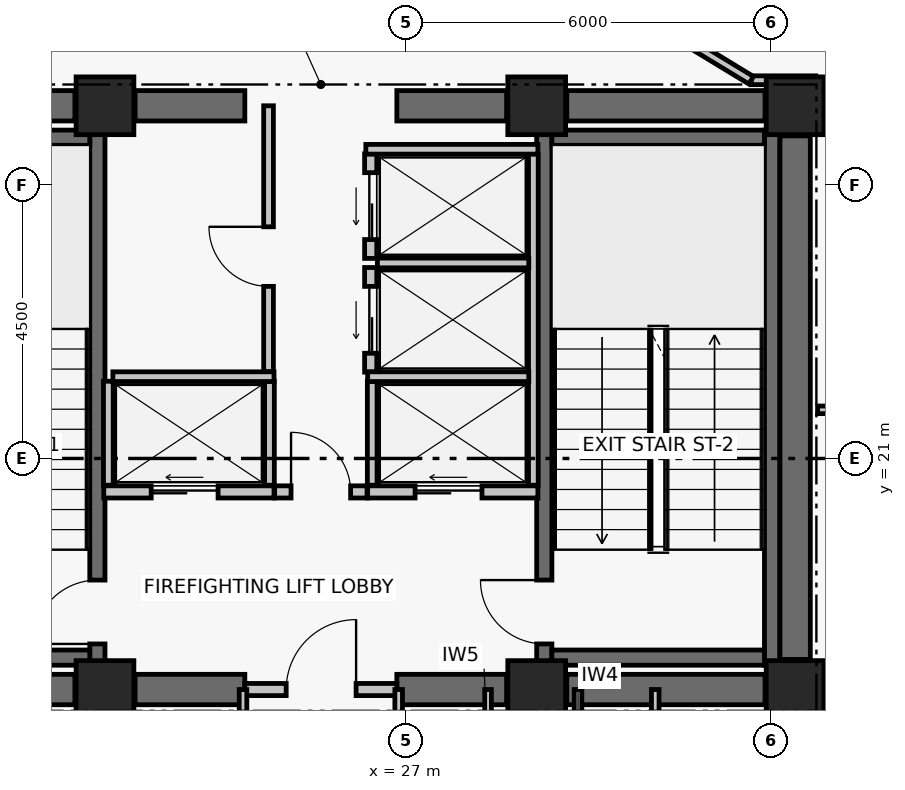
"""IFC4 building model, lengths in metres.
Left out: names, types, materials, properties, quantities, classifications, styles, units other than length and angle.
Written with IfcOpenShell. Run it as: python <this file> out.ifc"""

import sys

from ifc_helpers import new_model, si_unit, direction, frame, frame_2d, origin, origin_2d, place, context, subcontext, project, spatial, rectangle, extrude, element, fill, save


model = new_model("IFC4")
c1 = context("Model", 3, precision=1e-05, world=origin(), true_north=direction((0.0, 1.0)))
c2 = subcontext(c1, "Body", "Model", "MODEL_VIEW")
j1 = project(units=[si_unit("LENGTHUNIT", "METRE"), si_unit("PLANEANGLEUNIT", "RADIAN")], contexts=[c1])
p1 = place(None, origin())
s1 = spatial("IfcSite", under=j1, at=p1, CompositionType="ELEMENT")
p2 = place(p1, origin())
s2 = spatial("IfcBuilding", under=s1, at=p2, CompositionType="ELEMENT")
p3 = place(p2, frame((0.0, 0.0, 172.92)))
s3 = spatial("IfcBuildingStorey", under=s2, at=p3, CompositionType="ELEMENT", Elevation=172.92)
for number, where, z_axis, x_axis in (
    (1, (22.05, 17.2, 0.0), (0.0, 0.0, 1.0), (1.0, 0.0, 0.0)),
    (2, (29.15, 17.2, 0.0), (0.0, 0.0, 1.0), (1.0, 0.0, 0.0)),
    (3, (33.4, 17.2, 0.0), (0.0, 0.0, 1.0), (1.0, 0.0, 0.0)),
    (4, (22.05, 26.8, 0.0), (0.0, 0.0, 1.0), (1.0, 0.0, 0.0)),
    (5, (29.15, 26.8, 0.0), (0.0, 0.0, 1.0), (1.0, 0.0, 0.0)),
    (6, (33.4, 26.8, 0.0), (0.0, 0.0, 1.0), (1.0, 0.0, 0.0)),
):
    element("IfcColumn", number, at=place(p3, frame(where, z_axis=z_axis, x_axis=x_axis)), inside=s3, PredefinedType="COLUMN", context=c2, shape_type="SweptSolid", body=[
        extrude(rectangle(XDim=0.95, YDim=0.95, at=origin_2d()), origin(), (0.0, 0.0, 1.0), 3.72),
    ])
p4 = place(p3, frame((18.295, 17.2, 0.0), z_axis=(0.0, 0.0, 1.0), x_axis=(1.0, 0.0, 0.0)))
e7 = element("IfcWall", 7, at=p4, inside=s3, PredefinedType="SHEAR", context=c2, shape_type="SweptSolid", body=[
    extrude(rectangle(XDim=3.26, YDim=0.5, at=frame_2d((1.63, 0.0))), origin(), (0.0, 0.0, 1.0), 3.5),
])
p5 = place(p3, frame((22.545, 17.2, 0.0), z_axis=(0.0, 0.0, 1.0), x_axis=(1.0, 0.0, 0.0)))
e8 = element("IfcWall", 8, at=p5, inside=s3, PredefinedType="SHEAR", context=c2, shape_type="SweptSolid", body=[
    extrude(rectangle(XDim=1.805, YDim=0.5, at=frame_2d((0.903, 0.0))), origin(), (0.0, 0.0, 1.0), 3.5),
])
p6 = place(p3, frame((26.85, 17.2, 0.0), z_axis=(0.0, 0.0, 1.0), x_axis=(1.0, 0.0, 0.0)))
e9 = element("IfcWall", 9, at=p6, inside=s3, PredefinedType="SHEAR", context=c2, shape_type="SweptSolid", body=[
    extrude(rectangle(XDim=1.805, YDim=0.5, at=frame_2d((0.902, 0.0))), origin(), (0.0, 0.0, 1.0), 3.5),
])
for number, where, z_axis, x_axis in (
    (10, (29.645, 17.2, 0.0), (0.0, 0.0, 1.0), (1.0, 0.0, 0.0)),
    (11, (18.295, 26.8, 0.0), (0.0, 0.0, 1.0), (1.0, 0.0, 0.0)),
):
    element("IfcWall", number, at=place(p3, frame(where, z_axis=z_axis, x_axis=x_axis)), inside=s3, PredefinedType="SHEAR", context=c2, shape_type="SweptSolid", body=[
        extrude(rectangle(XDim=3.26, YDim=0.5, at=frame_2d((1.63, 0.0))), origin(), (0.0, 0.0, 1.0), 3.5),
    ])
p7 = place(p3, frame((22.545, 26.8, 0.0), z_axis=(0.0, 0.0, 1.0), x_axis=(1.0, 0.0, 0.0)))
e12 = element("IfcWall", 12, at=p7, inside=s3, PredefinedType="SHEAR", context=c2, shape_type="SweptSolid", body=[
    extrude(rectangle(XDim=1.805, YDim=0.5, at=frame_2d((0.903, 0.0))), origin(), (0.0, 0.0, 1.0), 3.5),
])
p8 = place(p3, frame((26.85, 26.8, 0.0), z_axis=(0.0, 0.0, 1.0), x_axis=(1.0, 0.0, 0.0)))
e13 = element("IfcWall", 13, at=p8, inside=s3, PredefinedType="SHEAR", context=c2, shape_type="SweptSolid", body=[
    extrude(rectangle(XDim=1.805, YDim=0.5, at=frame_2d((0.902, 0.0))), origin(), (0.0, 0.0, 1.0), 3.5),
])
p9 = place(p3, frame((29.645, 26.8, 0.0), z_axis=(0.0, 0.0, 1.0), x_axis=(1.0, 0.0, 0.0)))
e14 = element("IfcWall", 14, at=p9, inside=s3, PredefinedType="SHEAR", context=c2, shape_type="SweptSolid", body=[
    extrude(rectangle(XDim=3.26, YDim=0.5, at=frame_2d((1.63, 0.0))), origin(), (0.0, 0.0, 1.0), 3.5),
])
p10 = place(p3, frame((33.4, 17.695, 0.0), z_axis=(0.0, 0.0, 1.0), x_axis=(0.0, 1.0, 0.0)))
e15 = element("IfcWall", 15, at=p10, inside=s3, PredefinedType="SHEAR", context=c2, shape_type="SweptSolid", body=[
    extrude(rectangle(XDim=8.61, YDim=0.5, at=frame_2d((4.305, 0.0))), origin(), (0.0, 0.0, 1.0), 3.5),
])
p11 = place(p3, frame((21.925, 17.6, 0.0), z_axis=(0.0, 0.0, 1.0), x_axis=(0.0, 1.0, 0.0)))
e16 = element("IfcWall", 16, at=p11, inside=s3, PredefinedType="SHEAR", context=c2, shape_type="SweptSolid", body=[
    extrude(rectangle(XDim=8.8, YDim=0.25, at=frame_2d((4.4, 0.0))), origin(), (0.0, 0.0, 1.0), 3.5),
])
p12 = place(p11, frame((0.35, 0.0, 0.0)))
e17 = element("IfcOpeningElement", 17, at=p12, cuts=e16, PredefinedType="OPENING", context=c2, shape_type="SweptSolid", body=[
    extrude(rectangle(XDim=1.05, YDim=2.08, at=frame_2d((0.525, 1.04))), frame((0.0, 0.135, 0.0), z_axis=(0.0, -1.0, 0.0), x_axis=(1.0, 0.0, 0.0)), (0.0, 0.0, 1.0), 0.27),
])
for number, where, z_axis, x_axis in (
    (18, (18.304, 17.725, 0.0), (0.0, 0.0, 1.0), (1.0, 0.0, 0.0)),
    (19, (18.304, 26.275, 0.0), (0.0, 0.0, 1.0), (1.0, 0.0, 0.0)),
):
    element("IfcWall", number, at=place(p3, frame(where, z_axis=z_axis, x_axis=x_axis)), inside=s3, PredefinedType="SHEAR", context=c2, shape_type="SweptSolid", body=[
        extrude(rectangle(XDim=3.496, YDim=0.25, at=frame_2d((1.748, 0.0))), origin(), (0.0, 0.0, 1.0), 3.5),
    ])
p13 = place(p3, frame((29.275, 17.6, 0.0), z_axis=(0.0, 0.0, 1.0), x_axis=(0.0, 1.0, 0.0)))
e20 = element("IfcWall", 20, at=p13, inside=s3, PredefinedType="SHEAR", context=c2, shape_type="SweptSolid", body=[
    extrude(rectangle(XDim=8.8, YDim=0.25, at=frame_2d((4.4, 0.0))), origin(), (0.0, 0.0, 1.0), 3.5),
])
p14 = place(p13, frame((0.35, 0.0, 0.0)))
e21 = element("IfcOpeningElement", 21, at=p14, cuts=e20, PredefinedType="OPENING", context=c2, shape_type="SweptSolid", body=[
    extrude(rectangle(XDim=1.05, YDim=2.08, at=frame_2d((0.525, 1.04))), frame((0.0, 0.135, 0.0), z_axis=(0.0, -1.0, 0.0), x_axis=(1.0, 0.0, 0.0)), (0.0, 0.0, 1.0), 0.27),
])
p15 = place(p3, frame((33.021, 17.6, 0.0), z_axis=(0.0, 0.0, 1.0), x_axis=(0.0, 1.0, 0.0)))
e22 = element("IfcWall", 22, at=p15, inside=s3, PredefinedType="SHEAR", context=c2, shape_type="SweptSolid", body=[
    extrude(rectangle(XDim=8.8, YDim=0.25, at=frame_2d((4.4, 0.0))), origin(), (0.0, 0.0, 1.0), 3.5),
])
for number, where, z_axis, x_axis in (
    (23, (29.4, 17.725, 0.0), (0.0, 0.0, 1.0), (1.0, 0.0, 0.0)),
    (24, (29.4, 26.275, 0.0), (0.0, 0.0, 1.0), (1.0, 0.0, 0.0)),
):
    element("IfcWall", number, at=place(p3, frame(where, z_axis=z_axis, x_axis=x_axis)), inside=s3, PredefinedType="SHEAR", context=c2, shape_type="SweptSolid", body=[
        extrude(rectangle(XDim=3.496, YDim=0.25, at=frame_2d((1.748, 0.0))), origin(), (0.0, 0.0, 1.0), 3.5),
    ])
p16 = place(p3, frame((24.35, 17.2, 0.0), z_axis=(0.0, 0.0, 1.0), x_axis=(1.0, 0.0, 0.0)))
e25 = element("IfcWall", 25, at=p16, inside=s3, PredefinedType="PARTITIONING", context=c2, shape_type="SweptSolid", body=[
    extrude(rectangle(XDim=2.5, YDim=0.2, at=frame_2d((1.25, 0.0))), origin(), (0.0, 0.0, 1.0), 2.63),
])
p17 = place(p16, frame((0.68, 0.0, 0.0)))
e26 = element("IfcOpeningElement", 26, at=p17, cuts=e25, PredefinedType="OPENING", context=c2, shape_type="SweptSolid", body=[
    extrude(rectangle(XDim=1.15, YDim=2.08, at=frame_2d((0.575, 1.04))), frame((0.0, 0.11, 0.0), z_axis=(0.0, -1.0, 0.0), x_axis=(1.0, 0.0, 0.0)), (0.0, 0.0, 1.0), 0.22),
])
p18 = place(p3, frame((24.84, 20.45, 0.0), z_axis=(0.0, 0.0, 1.0), x_axis=(1.0, 0.0, 0.0)))
e27 = element("IfcWall", 27, at=p18, inside=s3, PredefinedType="PARTITIONING", context=c2, shape_type="SweptSolid", body=[
    extrude(rectangle(XDim=1.52, YDim=0.2, at=frame_2d((0.76, 0.0))), origin(), (0.0, 0.0, 1.0), 3.5),
])
p19 = place(p18, frame((0.27, 0.0, 0.0)))
e28 = element("IfcOpeningElement", 28, at=p19, cuts=e27, PredefinedType="OPENING", context=c2, shape_type="SweptSolid", body=[
    extrude(rectangle(XDim=0.98, YDim=2.06, at=frame_2d((0.49, 1.03))), frame((0.0, 0.11, 0.0), z_axis=(0.0, -1.0, 0.0), x_axis=(1.0, 0.0, 0.0)), (0.0, 0.0, 1.0), 0.22),
])
p20 = place(p3, frame((22.03, 20.45, 0.0), z_axis=(0.0, 0.0, 1.0), x_axis=(1.0, 0.0, 0.0)))
e29 = element("IfcWall", 29, at=p20, inside=s3, PredefinedType="PARTITIONING", context=c2, shape_type="SweptSolid", body=[
    extrude(rectangle(XDim=2.8, YDim=0.2, at=frame_2d((1.4, 0.0))), origin(), (0.0, 0.0, 1.0), 3.5),
])
p21 = place(p20, frame((0.78, 0.0, 0.0)))
e30 = element("IfcOpeningElement", 30, at=p21, cuts=e29, PredefinedType="OPENING", context=c2, shape_type="SweptSolid", body=[
    extrude(rectangle(XDim=1.1, YDim=2.08, at=frame_2d((0.55, 1.04))), frame((0.0, 0.11, 0.0), z_axis=(0.0, -1.0, 0.0), x_axis=(1.0, 0.0, 0.0)), (0.0, 0.0, 1.0), 0.22),
])
p22 = place(p3, frame((26.37, 20.45, 0.0), z_axis=(0.0, 0.0, 1.0), x_axis=(1.0, 0.0, 0.0)))
e31 = element("IfcWall", 31, at=p22, inside=s3, PredefinedType="PARTITIONING", context=c2, shape_type="SweptSolid", body=[
    extrude(rectangle(XDim=2.8, YDim=0.2, at=frame_2d((1.4, 0.0))), origin(), (0.0, 0.0, 1.0), 3.5),
])
p23 = place(p22, frame((0.78, 0.0, 0.0)))
e32 = element("IfcOpeningElement", 32, at=p23, cuts=e31, PredefinedType="OPENING", context=c2, shape_type="SweptSolid", body=[
    extrude(rectangle(XDim=1.1, YDim=2.08, at=frame_2d((0.55, 1.04))), frame((0.0, 0.11, 0.0), z_axis=(0.0, -1.0, 0.0), x_axis=(1.0, 0.0, 0.0)), (0.0, 0.0, 1.0), 0.22),
])
p24 = place(p3, frame((26.42, 22.42, 0.0), z_axis=(0.0, 0.0, 1.0), x_axis=(0.0, 1.0, 0.0)))
e33 = element("IfcWall", 33, at=p24, inside=s3, PredefinedType="PARTITIONING", context=c2, shape_type="SweptSolid", body=[
    extrude(rectangle(XDim=1.72, YDim=0.2, at=frame_2d((0.86, 0.0))), origin(), (0.0, 0.0, 1.0), 3.5),
])
p25 = place(p24, frame((0.31, 0.0, 0.0)))
e34 = element("IfcOpeningElement", 34, at=p25, cuts=e33, PredefinedType="OPENING", context=c2, shape_type="SweptSolid", body=[
    extrude(rectangle(XDim=1.1, YDim=2.08, at=frame_2d((0.55, 1.04))), frame((0.0, 0.11, 0.0), z_axis=(0.0, -1.0, 0.0), x_axis=(1.0, 0.0, 0.0)), (0.0, 0.0, 1.0), 0.22),
])
p26 = place(p3, frame((26.42, 24.29, 0.0), z_axis=(0.0, 0.0, 1.0), x_axis=(0.0, 1.0, 0.0)))
e35 = element("IfcWall", 35, at=p26, inside=s3, PredefinedType="PARTITIONING", context=c2, shape_type="SweptSolid", body=[
    extrude(rectangle(XDim=1.72, YDim=0.2, at=frame_2d((0.86, 0.0))), origin(), (0.0, 0.0, 1.0), 3.5),
])
p27 = place(p26, frame((0.31, 0.0, 0.0)))
e36 = element("IfcOpeningElement", 36, at=p27, cuts=e35, PredefinedType="OPENING", context=c2, shape_type="SweptSolid", body=[
    extrude(rectangle(XDim=1.1, YDim=2.08, at=frame_2d((0.55, 1.04))), frame((0.0, 0.11, 0.0), z_axis=(0.0, -1.0, 0.0), x_axis=(1.0, 0.0, 0.0)), (0.0, 0.0, 1.0), 0.22),
])
for number, where, z_axis, x_axis in (
    (37, (22.105, 20.56, 0.0), (0.0, 0.0, 1.0), (0.0, 1.0, 0.0)),
    (38, (24.755, 20.56, 0.0), (0.0, 0.0, 1.0), (0.0, 1.0, 0.0)),
):
    element("IfcWall", number, at=place(p3, frame(where, z_axis=z_axis, x_axis=x_axis)), inside=s3, PredefinedType="PARTITIONING", context=c2, shape_type="SweptSolid", body=[
        extrude(rectangle(XDim=1.71, YDim=0.16, at=frame_2d((0.855, 0.0))), origin(), (0.0, 0.0, 1.0), 3.5),
    ])
p28 = place(p3, frame((22.18, 22.345, 0.0), z_axis=(0.0, 0.0, 1.0), x_axis=(1.0, 0.0, 0.0)))
e39 = element("IfcWall", 39, at=p28, inside=s3, PredefinedType="PARTITIONING", context=c2, shape_type="SweptSolid", body=[
    extrude(rectangle(XDim=2.65, YDim=0.16, at=frame_2d((1.325, 0.0))), origin(), (0.0, 0.0, 1.0), 3.5),
])
p29 = place(p3, frame((29.095, 20.56, 0.0), z_axis=(0.0, 0.0, 1.0), x_axis=(0.0, 1.0, 0.0)))
e40 = element("IfcWall", 40, at=p29, inside=s3, PredefinedType="PARTITIONING", context=c2, shape_type="SweptSolid", body=[
    extrude(rectangle(XDim=5.45, YDim=0.16, at=frame_2d((2.725, 0.0))), origin(), (0.0, 0.0, 1.0), 3.5),
])
p30 = place(p3, frame((26.445, 20.56, 0.0), z_axis=(0.0, 0.0, 1.0), x_axis=(0.0, 1.0, 0.0)))
e41 = element("IfcWall", 41, at=p30, inside=s3, PredefinedType="PARTITIONING", context=c2, shape_type="SweptSolid", body=[
    extrude(rectangle(XDim=1.71, YDim=0.16, at=frame_2d((0.855, 0.0))), origin(), (0.0, 0.0, 1.0), 3.5),
])
p31 = place(p3, frame((26.37, 22.345, 0.0), z_axis=(0.0, 0.0, 1.0), x_axis=(1.0, 0.0, 0.0)))
e42 = element("IfcWall", 42, at=p31, inside=s3, PredefinedType="PARTITIONING", context=c2, shape_type="SweptSolid", body=[
    extrude(rectangle(XDim=2.65, YDim=0.16, at=frame_2d((1.325, 0.0))), origin(), (0.0, 0.0, 1.0), 3.5),
])
p32 = place(p3, frame((26.53, 24.215, 0.0), z_axis=(0.0, 0.0, 1.0), x_axis=(1.0, 0.0, 0.0)))
e43 = element("IfcWall", 43, at=p32, inside=s3, PredefinedType="PARTITIONING", context=c2, shape_type="SweptSolid", body=[
    extrude(rectangle(XDim=2.49, YDim=0.16, at=frame_2d((1.245, 0.0))), origin(), (0.0, 0.0, 1.0), 3.5),
])
p33 = place(p3, frame((26.34, 26.085, 0.0), z_axis=(0.0, 0.0, 1.0), x_axis=(1.0, 0.0, 0.0)))
e44 = element("IfcWall", 44, at=p33, inside=s3, PredefinedType="PARTITIONING", context=c2, shape_type="SweptSolid", body=[
    extrude(rectangle(XDim=2.83, YDim=0.16, at=frame_2d((1.415, 0.0))), origin(), (0.0, 0.0, 1.0), 3.5),
])
p34 = place(p3, frame((24.74, 22.43, 0.0), z_axis=(0.0, 0.0, 1.0), x_axis=(0.0, 1.0, 0.0)))
e45 = element("IfcWall", 45, at=p34, inside=s3, PredefinedType="PARTITIONING", context=c2, shape_type="SweptSolid", body=[
    extrude(rectangle(XDim=4.37, YDim=0.16, at=frame_2d((2.185, 0.0))), origin(), (0.0, 0.0, 1.0), 2.63),
])
p35 = place(p34, frame((1.4, 0.0, 0.0)))
e46 = element("IfcOpeningElement", 46, at=p35, cuts=e45, PredefinedType="OPENING", context=c2, shape_type="SweptSolid", body=[
    extrude(rectangle(XDim=0.98, YDim=2.06, at=frame_2d((0.49, 1.03))), frame((0.0, 0.09, 0.0), z_axis=(0.0, -1.0, 0.0), x_axis=(1.0, 0.0, 0.0)), (0.0, 0.0, 1.0), 0.18),
])
for number, where, z_axis, x_axis in (
    (47, (24.32, 14.95, 0.0), (0.0, 0.0, 1.0), (0.0, 1.0, 0.0)),
    (48, (26.88, 14.95, 0.0), (0.0, 0.0, 1.0), (0.0, 1.0, 0.0)),
):
    element("IfcWall", number, at=place(p3, frame(where, z_axis=z_axis, x_axis=x_axis)), inside=s3, PredefinedType="PARTITIONING", context=c2, shape_type="SweptSolid", body=[
        extrude(rectangle(XDim=2.25, YDim=0.125, at=frame_2d((1.125, 0.0))), origin(), (0.0, 0.0, 1.0), 2.63),
    ])
p36 = place(p3, frame((28.35, 14.95, 0.0), z_axis=(0.0, 0.0, 1.0), x_axis=(0.0, 1.0, 0.0)))
e49 = element("IfcWall", 49, at=p36, inside=s3, PredefinedType="PARTITIONING", context=c2, shape_type="SweptSolid", body=[
    extrude(rectangle(XDim=2.25, YDim=0.11, at=frame_2d((1.125, 0.0))), origin(), (0.0, 0.0, 1.0), 2.63),
])
for number, where, z_axis, x_axis in (
    (50, (29.83, 14.95, 0.0), (0.0, 0.0, 1.0), (0.0, 1.0, 0.0)),
    (51, (31.1, 14.95, 0.0), (0.0, 0.0, 1.0), (0.0, 1.0, 0.0)),
):
    element("IfcWall", number, at=place(p3, frame(where, z_axis=z_axis, x_axis=x_axis)), inside=s3, PredefinedType="PARTITIONING", context=c2, shape_type="SweptSolid", body=[
        extrude(rectangle(XDim=2.25, YDim=0.125, at=frame_2d((1.125, 0.0))), origin(), (0.0, 0.0, 1.0), 2.63),
    ])
p37 = place(p3, frame((33.74, 27.22, 0.0), z_axis=(0.0, 0.0, 1.0), x_axis=(-1.0, 0.0, 0.0)))
e52 = element("IfcWall", 52, at=p37, inside=s3, PredefinedType="PARTITIONING", context=c2, shape_type="SweptSolid", body=[
    extrude(rectangle(XDim=1.062, YDim=0.145, at=frame_2d((0.531, 0.0))), origin(), (0.0, 0.0, 1.0), 2.63),
])
p38 = place(p3, frame((32.677, 27.22, 0.0), z_axis=(0.0, 0.0, 1.0), x_axis=(-0.854620308946, 0.51925343286, 0.0)))
e53 = element("IfcWall", 53, at=p38, inside=s3, PredefinedType="PARTITIONING", context=c2, shape_type="SweptSolid", body=[
    extrude(rectangle(XDim=1.296, YDim=0.145, at=frame_2d((0.648, 0.0))), origin(), (0.0, 0.0, 1.0), 2.63),
])
p39 = place(p3, frame((33.77, 21.8, 0.0), z_axis=(0.0, 0.0, 1.0), x_axis=(1.0, 0.0, 0.0)))
e54 = element("IfcWall", 54, at=p39, inside=s3, PredefinedType="PARTITIONING", context=c2, shape_type="SweptSolid", body=[
    extrude(rectangle(XDim=7.5, YDim=0.125, at=frame_2d((3.75, 0.0))), origin(), (0.0, 0.0, 1.0), 2.63),
])
p40 = place(p39, frame((1.032, 0.0, 0.0)))
e55 = element("IfcOpeningElement", 55, at=p40, cuts=e54, PredefinedType="OPENING", context=c2, shape_type="SweptSolid", body=[
    extrude(rectangle(XDim=0.92, YDim=2.05, at=frame_2d((0.46, 1.025))), frame((0.0, 0.073, 0.0), z_axis=(0.0, -1.0, 0.0), x_axis=(1.0, 0.0, 0.0)), (0.0, 0.0, 1.0), 0.145),
])
p41 = place(p12, origin())
e56 = element("IfcDoor", 56, at=p41, inside=s3, OperationType="SINGLE_SWING_LEFT", PredefinedType="DOOR", context=c2, shape_type="SweptSolid", body=[
    extrude(rectangle(XDim=1.05, YDim=2.08, at=frame_2d((0.525, 1.04))), frame((0.0, 0.025, 0.0), z_axis=(0.0, -1.0, 0.0), x_axis=(1.0, 0.0, 0.0)), (0.0, 0.0, 1.0), 0.05),
])
fill(e17, e56)
p42 = place(p14, origin())
e57 = element("IfcDoor", 57, at=p42, inside=s3, OperationType="SINGLE_SWING_RIGHT", PredefinedType="DOOR", context=c2, shape_type="SweptSolid", body=[
    extrude(rectangle(XDim=1.05, YDim=2.08, at=frame_2d((0.525, 1.04))), frame((0.0, 0.025, 0.0), z_axis=(0.0, -1.0, 0.0), x_axis=(1.0, 0.0, 0.0)), (0.0, 0.0, 1.0), 0.05),
])
fill(e21, e57)
p43 = place(p17, origin())
e58 = element("IfcDoor", 58, at=p43, inside=s3, OperationType="SINGLE_SWING_RIGHT", PredefinedType="DOOR", context=c2, shape_type="SweptSolid", body=[
    extrude(rectangle(XDim=1.15, YDim=2.08, at=frame_2d((0.575, 1.04))), frame((0.0, 0.025, 0.0), z_axis=(0.0, -1.0, 0.0), x_axis=(1.0, 0.0, 0.0)), (0.0, 0.0, 1.0), 0.05),
])
fill(e26, e58)
p44 = place(p19, origin())
e59 = element("IfcDoor", 59, at=p44, inside=s3, OperationType="SINGLE_SWING_LEFT", PredefinedType="DOOR", context=c2, shape_type="SweptSolid", body=[
    extrude(rectangle(XDim=0.98, YDim=2.06, at=frame_2d((0.49, 1.03))), frame((0.0, 0.025, 0.0), z_axis=(0.0, -1.0, 0.0), x_axis=(1.0, 0.0, 0.0)), (0.0, 0.0, 1.0), 0.05),
])
fill(e28, e59)
p45 = place(p21, origin())
e60 = element("IfcDoor", 60, at=p45, inside=s3, OperationType="DOUBLE_DOOR_SLIDING", PredefinedType="DOOR", context=c2, shape_type="SweptSolid", body=[
    extrude(rectangle(XDim=1.1, YDim=2.08, at=frame_2d((0.55, 1.04))), frame((0.0, 0.025, 0.0), z_axis=(0.0, -1.0, 0.0), x_axis=(1.0, 0.0, 0.0)), (0.0, 0.0, 1.0), 0.05),
])
fill(e30, e60)
p46 = place(p23, origin())
e61 = element("IfcDoor", 61, at=p46, inside=s3, OperationType="DOUBLE_DOOR_SLIDING", PredefinedType="DOOR", context=c2, shape_type="SweptSolid", body=[
    extrude(rectangle(XDim=1.1, YDim=2.08, at=frame_2d((0.55, 1.04))), frame((0.0, 0.025, 0.0), z_axis=(0.0, -1.0, 0.0), x_axis=(1.0, 0.0, 0.0)), (0.0, 0.0, 1.0), 0.05),
])
fill(e32, e61)
p47 = place(p25, origin())
e62 = element("IfcDoor", 62, at=p47, inside=s3, OperationType="DOUBLE_DOOR_SLIDING", PredefinedType="DOOR", context=c2, shape_type="SweptSolid", body=[
    extrude(rectangle(XDim=1.1, YDim=2.08, at=frame_2d((0.55, 1.04))), frame((0.0, 0.025, 0.0), z_axis=(0.0, -1.0, 0.0), x_axis=(1.0, 0.0, 0.0)), (0.0, 0.0, 1.0), 0.05),
])
fill(e34, e62)
p48 = place(p27, origin())
e63 = element("IfcDoor", 63, at=p48, inside=s3, OperationType="DOUBLE_DOOR_SLIDING", PredefinedType="DOOR", context=c2, shape_type="SweptSolid", body=[
    extrude(rectangle(XDim=1.1, YDim=2.08, at=frame_2d((0.55, 1.04))), frame((0.0, 0.025, 0.0), z_axis=(0.0, -1.0, 0.0), x_axis=(1.0, 0.0, 0.0)), (0.0, 0.0, 1.0), 0.05),
])
fill(e36, e63)
p49 = place(p35, origin())
e64 = element("IfcDoor", 64, at=p49, inside=s3, OperationType="SINGLE_SWING_RIGHT", PredefinedType="DOOR", context=c2, shape_type="SweptSolid", body=[
    extrude(rectangle(XDim=0.98, YDim=2.06, at=frame_2d((0.49, 1.03))), frame((0.0, 0.025, 0.0), z_axis=(0.0, -1.0, 0.0), x_axis=(1.0, 0.0, 0.0)), (0.0, 0.0, 1.0), 0.05),
])
fill(e46, e64)
save(model, sys.argv[1])
